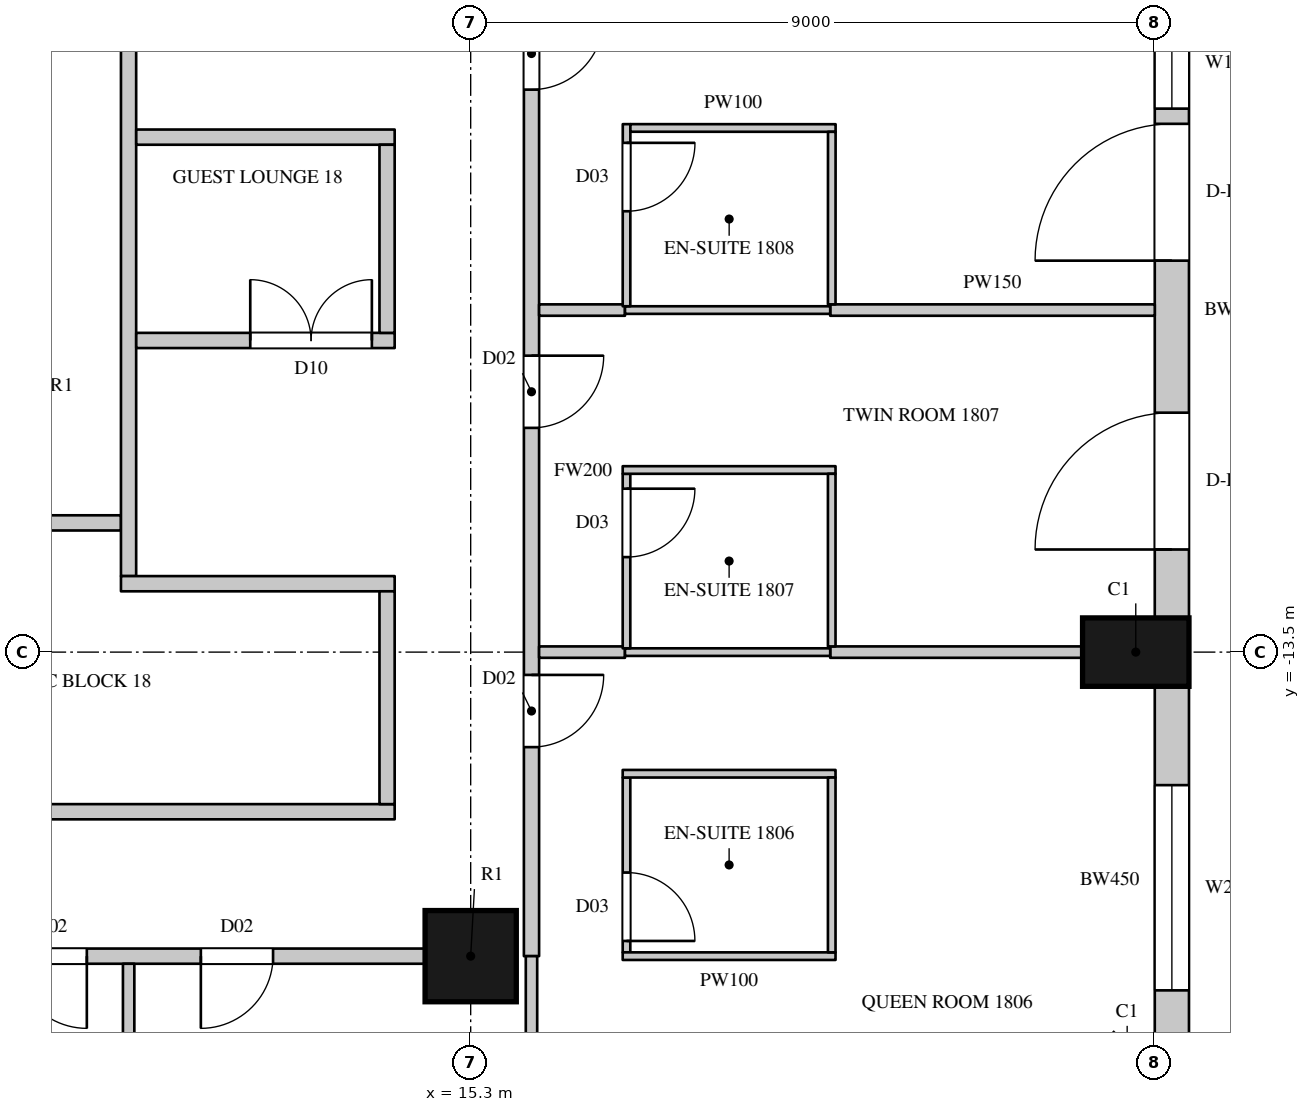
"""IFC4 building model, lengths in metres.
Left out: names, types, materials, properties, quantities, classifications, styles, units other than length and angle.
Written with IfcOpenShell. Run it as: python <this file> out.ifc"""

import sys

from ifc_helpers import new_model, si_unit, direction, frame, frame_2d, origin, origin_2d, place, context, subcontext, project, spatial, rectangle, circle, extrude, element, fill, save


model = new_model("IFC4")
c1 = context("Model", 3, precision=1e-05, world=origin(), true_north=direction((0.0, 1.0)))
c2 = subcontext(c1, "Body", "Model", "MODEL_VIEW")
j1 = project(units=[si_unit("LENGTHUNIT", "METRE"), si_unit("PLANEANGLEUNIT", "RADIAN")], contexts=[c1])
p1 = place(None, origin())
s1 = spatial("IfcSite", under=j1, at=p1, CompositionType="ELEMENT")
p2 = place(p1, origin())
s2 = spatial("IfcBuilding", under=s1, at=p2, CompositionType="ELEMENT")
p3 = place(p2, frame((0.0, 0.0, 95.1)))
s3 = spatial("IfcBuildingStorey", under=s2, at=p3, CompositionType="ELEMENT", Elevation=95.1)
p4 = place(p3, frame((24.05, -13.5, 0.0), z_axis=(0.0, 0.0, 1.0), x_axis=(0.0, 1.0, 0.0)))
e1 = element("IfcColumn", 1, at=p4, inside=s3, PredefinedType="COLUMN", context=c2, shape_type="SweptSolid", body=[
    extrude(rectangle(XDim=0.9, YDim=1.4, at=origin_2d()), origin(), (0.0, 0.0, 1.0), 3.6),
])
p5 = place(p3, frame((15.3, -17.5, 0.0), z_axis=(0.0, 0.0, 1.0), x_axis=(1.0, 0.0, 0.0)))
e2 = element("IfcColumn", 2, at=p5, inside=s3, PredefinedType="COLUMN", context=c2, shape_type="SweptSolid", body=[
    extrude(circle(Radius=0.6, at=origin_2d()), origin(), (0.0, 0.0, 1.0), 3.6),
])
p6 = place(p3, frame((24.525, -19.064, 0.0), z_axis=(0.0, 0.0, 1.0), x_axis=(0.0, 1.0, 0.0)))
e3 = element("IfcWall", 3, at=p6, inside=s3, PredefinedType="SOLIDWALL", context=c2, shape_type="SweptSolid", body=[
    extrude(rectangle(XDim=5.114, YDim=0.45, at=frame_2d((2.557, 0.0))), origin(), (0.0, 0.0, 1.0), 3.3),
])
p7 = place(p6, frame((1.114, 0.0, 1.05)))
e4 = element("IfcOpeningElement", 4, at=p7, cuts=e3, PredefinedType="OPENING", context=c2, shape_type="SweptSolid", body=[
    extrude(rectangle(XDim=2.7, YDim=2.0, at=frame_2d((1.35, 1.0))), frame((0.0, 0.235, 0.0), z_axis=(0.0, -1.0, 0.0), x_axis=(1.0, 0.0, 0.0)), (0.0, 0.0, 1.0), 0.47),
])
p8 = place(p3, frame((24.525, -13.05, 0.0), z_axis=(0.0, 0.0, 1.0), x_axis=(0.0, 1.0, 0.0)))
e5 = element("IfcWall", 5, at=p8, inside=s3, PredefinedType="SOLIDWALL", context=c2, shape_type="SweptSolid", body=[
    extrude(rectangle(XDim=8.1, YDim=0.45, at=frame_2d((4.05, 0.0))), origin(), (0.0, 0.0, 1.0), 3.3),
])
p9 = place(p8, frame((0.9, 0.0, 0.0)))
e6 = element("IfcOpeningElement", 6, at=p9, cuts=e5, PredefinedType="OPENING", context=c2, shape_type="SweptSolid", body=[
    extrude(rectangle(XDim=1.8, YDim=2.4, at=frame_2d((0.9, 1.2))), frame((0.0, 0.235, 0.0), z_axis=(0.0, -1.0, 0.0), x_axis=(1.0, 0.0, 0.0)), (0.0, 0.0, 1.0), 0.47),
])
p10 = place(p8, frame((4.7, 0.0, 0.0)))
e7 = element("IfcOpeningElement", 7, at=p10, cuts=e5, PredefinedType="OPENING", context=c2, shape_type="SweptSolid", body=[
    extrude(rectangle(XDim=1.8, YDim=2.4, at=frame_2d((0.9, 1.2))), frame((0.0, 0.235, 0.0), z_axis=(0.0, -1.0, 0.0), x_axis=(1.0, 0.0, 0.0)), (0.0, 0.0, 1.0), 0.47),
])
p11 = place(p8, frame((6.7, 0.0, 1.05)))
e8 = element("IfcOpeningElement", 8, at=p11, cuts=e5, PredefinedType="OPENING", context=c2, shape_type="SweptSolid", body=[
    extrude(rectangle(XDim=1.2, YDim=2.0, at=frame_2d((0.6, 1.0))), frame((0.0, 0.235, 0.0), z_axis=(0.0, -1.0, 0.0), x_axis=(1.0, 0.0, 0.0)), (0.0, 0.0, 1.0), 0.47),
])
p12 = place(p3, frame((6.9, -17.5, 0.0), z_axis=(0.0, 0.0, 1.0), x_axis=(1.0, 0.0, 0.0)))
e9 = element("IfcWall", 9, at=p12, inside=s3, PredefinedType="PARTITIONING", context=c2, shape_type="SweptSolid", body=[
    extrude(rectangle(XDim=7.8, YDim=0.2, at=frame_2d((3.9, 0.0))), origin(), (0.0, 0.0, 1.0), 2.75),
])
p13 = place(p12, frame((2.4, 0.0, 0.0)))
e10 = element("IfcOpeningElement", 10, at=p13, cuts=e9, PredefinedType="OPENING", context=c2, shape_type="SweptSolid", body=[
    extrude(rectangle(XDim=0.95, YDim=2.2, at=frame_2d((0.475, 1.1))), frame((0.0, 0.11, 0.0), z_axis=(0.0, -1.0, 0.0), x_axis=(1.0, 0.0, 0.0)), (0.0, 0.0, 1.0), 0.22),
])
p14 = place(p12, frame((4.85, 0.0, 0.0)))
e11 = element("IfcOpeningElement", 11, at=p14, cuts=e9, PredefinedType="OPENING", context=c2, shape_type="SweptSolid", body=[
    extrude(rectangle(XDim=0.95, YDim=2.2, at=frame_2d((0.475, 1.1))), frame((0.0, 0.11, 0.0), z_axis=(0.0, -1.0, 0.0), x_axis=(1.0, 0.0, 0.0)), (0.0, 0.0, 1.0), 0.22),
])
p15 = place(p3, frame((-8.7, -11.8, 0.0), z_axis=(0.0, 0.0, 1.0), x_axis=(1.0, 0.0, 0.0)))
e12 = element("IfcWall", 12, at=p15, inside=s3, PredefinedType="PARTITIONING", context=c2, shape_type="SweptSolid", body=[
    extrude(rectangle(XDim=19.4, YDim=0.2, at=frame_2d((9.7, 0.0))), origin(), (0.0, 0.0, 1.0), 3.3),
])
p16 = place(p15, frame((6.95, 0.0, 0.0)))
e13 = element("IfcOpeningElement", 13, at=p16, cuts=e12, PredefinedType="OPENING", context=c2, shape_type="SweptSolid", body=[
    extrude(rectangle(XDim=1.5, YDim=2.2, at=frame_2d((0.75, 1.1))), frame((0.0, 0.11, 0.0), z_axis=(0.0, -1.0, 0.0), x_axis=(1.0, 0.0, 0.0)), (0.0, 0.0, 1.0), 0.22),
])
p17 = place(p3, frame((0.1, -15.6, 0.0), z_axis=(0.0, 0.0, 1.0), x_axis=(1.0, 0.0, 0.0)))
e14 = element("IfcWall", 14, at=p17, inside=s3, PredefinedType="PARTITIONING", context=c2, shape_type="SweptSolid", body=[
    extrude(rectangle(XDim=14.2, YDim=0.2, at=frame_2d((7.1, 0.0))), origin(), (0.0, 0.0, 1.0), 3.3),
])
p18 = place(p3, frame((10.799, -12.5, 0.0), z_axis=(0.0, 0.0, 1.0), x_axis=(0.0, 1.0, 0.0)))
e15 = element("IfcWall", 15, at=p18, inside=s3, PredefinedType="PARTITIONING", context=c2, shape_type="SweptSolid", body=[
    extrude(rectangle(XDim=24.2, YDim=0.2, at=frame_2d((12.1, 0.0))), origin(), (0.0, 0.0, 1.0), 3.3),
])
p19 = place(p18, frame((13.15, 0.0, 0.0)))
e16 = element("IfcOpeningElement", 16, at=p19, cuts=e15, PredefinedType="OPENING", context=c2, shape_type="SweptSolid", body=[
    extrude(rectangle(XDim=1.5, YDim=2.2, at=frame_2d((0.75, 1.1))), frame((0.0, 0.11, 0.0), z_axis=(0.0, -1.0, 0.0), x_axis=(1.0, 0.0, 0.0)), (0.0, 0.0, 1.0), 0.22),
])
p20 = place(p3, frame((10.699, -12.6, 0.0), z_axis=(0.0, 0.0, 1.0), x_axis=(1.0, 0.0, 0.0)))
e17 = element("IfcWall", 17, at=p20, inside=s3, PredefinedType="PARTITIONING", context=c2, shape_type="SweptSolid", body=[
    extrude(rectangle(XDim=3.601, YDim=0.2, at=frame_2d((1.801, 0.0))), origin(), (0.0, 0.0, 1.0), 3.3),
])
p21 = place(p3, frame((10.9, -9.4, 0.0), z_axis=(0.0, 0.0, 1.0), x_axis=(1.0, 0.0, 0.0)))
e18 = element("IfcWall", 18, at=p21, inside=s3, PredefinedType="PARTITIONING", context=c2, shape_type="SweptSolid", body=[
    extrude(rectangle(XDim=3.4, YDim=0.2, at=frame_2d((1.7, 0.0))), origin(), (0.0, 0.0, 1.0), 3.3),
])
p22 = place(p21, frame((1.5, 0.0, 0.0)))
e19 = element("IfcOpeningElement", 19, at=p22, cuts=e18, PredefinedType="OPENING", context=c2, shape_type="SweptSolid", body=[
    extrude(rectangle(XDim=1.6, YDim=2.4, at=frame_2d((0.8, 1.2))), frame((0.0, 0.11, 0.0), z_axis=(0.0, -1.0, 0.0), x_axis=(1.0, 0.0, 0.0)), (0.0, 0.0, 1.0), 0.22),
])
p23 = place(p3, frame((10.9, -6.725, 0.0), z_axis=(0.0, 0.0, 1.0), x_axis=(1.0, 0.0, 0.0)))
e20 = element("IfcWall", 20, at=p23, inside=s3, PredefinedType="PARTITIONING", context=c2, shape_type="SweptSolid", body=[
    extrude(rectangle(XDim=3.4, YDim=0.2, at=frame_2d((1.7, 0.0))), origin(), (0.0, 0.0, 1.0), 3.3),
])
p24 = place(p3, frame((14.2, -15.5, 0.0), z_axis=(0.0, 0.0, 1.0), x_axis=(0.0, 1.0, 0.0)))
e21 = element("IfcWall", 21, at=p24, inside=s3, PredefinedType="PARTITIONING", context=c2, shape_type="SweptSolid", body=[
    extrude(rectangle(XDim=2.8, YDim=0.2, at=frame_2d((1.4, 0.0))), origin(), (0.0, 0.0, 1.0), 3.3),
])
p25 = place(p3, frame((14.2, -9.3, 0.0), z_axis=(0.0, 0.0, 1.0), x_axis=(0.0, 1.0, 0.0)))
e22 = element("IfcWall", 22, at=p25, inside=s3, PredefinedType="PARTITIONING", context=c2, shape_type="SweptSolid", body=[
    extrude(rectangle(XDim=2.475, YDim=0.2, at=frame_2d((1.238, 0.0))), origin(), (0.0, 0.0, 1.0), 3.3),
])
p26 = place(p3, frame((16.1, -17.5, 0.0), z_axis=(0.0, 0.0, 1.0), x_axis=(0.0, 1.0, 0.0)))
e23 = element("IfcWall", 23, at=p26, inside=s3, PredefinedType="PARTITIONING", context=c2, shape_type="SweptSolid", body=[
    extrude(rectangle(XDim=12.75, YDim=0.2, at=frame_2d((6.375, 0.0))), origin(), (0.0, 0.0, 1.0), 3.3),
])
p27 = place(p26, frame((2.75, 0.0, 0.0)))
e24 = element("IfcOpeningElement", 24, at=p27, cuts=e23, PredefinedType="OPENING", context=c2, shape_type="SweptSolid", body=[
    extrude(rectangle(XDim=0.95, YDim=2.2, at=frame_2d((0.475, 1.1))), frame((0.0, 0.11, 0.0), z_axis=(0.0, -1.0, 0.0), x_axis=(1.0, 0.0, 0.0)), (0.0, 0.0, 1.0), 0.22),
])
p28 = place(p26, frame((6.95, 0.0, 0.0)))
e25 = element("IfcOpeningElement", 25, at=p28, cuts=e23, PredefinedType="OPENING", context=c2, shape_type="SweptSolid", body=[
    extrude(rectangle(XDim=0.95, YDim=2.2, at=frame_2d((0.475, 1.1))), frame((0.0, 0.11, 0.0), z_axis=(0.0, -1.0, 0.0), x_axis=(1.0, 0.0, 0.0)), (0.0, 0.0, 1.0), 0.22),
])
p29 = place(p26, frame((11.4, 0.0, 0.0)))
e26 = element("IfcOpeningElement", 26, at=p29, cuts=e23, PredefinedType="OPENING", context=c2, shape_type="SweptSolid", body=[
    extrude(rectangle(XDim=0.95, YDim=2.2, at=frame_2d((0.475, 1.1))), frame((0.0, 0.11, 0.0), z_axis=(0.0, -1.0, 0.0), x_axis=(1.0, 0.0, 0.0)), (0.0, 0.0, 1.0), 0.22),
])
p30 = place(p3, frame((10.8, -25.7, 0.0), z_axis=(0.0, 0.0, 1.0), x_axis=(0.0, 1.0, 0.0)))
e27 = element("IfcWall", 27, at=p30, inside=s3, PredefinedType="PARTITIONING", context=c2, shape_type="SweptSolid", body=[
    extrude(rectangle(XDim=8.1, YDim=0.15, at=frame_2d((4.05, 0.0))), origin(), (0.0, 0.0, 1.0), 2.65),
])
p31 = place(p3, frame((16.1, -18.73, 0.0), z_axis=(0.0, 0.0, 1.0), x_axis=(0.0, 1.0, 0.0)))
e28 = element("IfcWall", 28, at=p31, inside=s3, PredefinedType="PARTITIONING", context=c2, shape_type="SweptSolid", body=[
    extrude(rectangle(XDim=1.23, YDim=0.15, at=frame_2d((0.615, 0.0))), origin(), (0.0, 0.0, 1.0), 3.3),
])
p32 = place(p3, frame((16.2, -13.5, 0.0), z_axis=(0.0, 0.0, 1.0), x_axis=(1.0, 0.0, 0.0)))
e29 = element("IfcWall", 29, at=p32, inside=s3, PredefinedType="PARTITIONING", context=c2, shape_type="SweptSolid", body=[
    extrude(rectangle(XDim=1.13, YDim=0.15, at=frame_2d((0.565, 0.0))), origin(), (0.0, 0.0, 1.0), 3.3),
])
p33 = place(p3, frame((16.2, -9.0, 0.0), z_axis=(0.0, 0.0, 1.0), x_axis=(1.0, 0.0, 0.0)))
e30 = element("IfcWall", 30, at=p33, inside=s3, PredefinedType="PARTITIONING", context=c2, shape_type="SweptSolid", body=[
    extrude(rectangle(XDim=1.13, YDim=0.15, at=frame_2d((0.565, 0.0))), origin(), (0.0, 0.0, 1.0), 2.65),
])
p34 = place(p3, frame((20.03, -13.5, 0.0), z_axis=(0.0, 0.0, 1.0), x_axis=(1.0, 0.0, 0.0)))
e31 = element("IfcWall", 31, at=p34, inside=s3, PredefinedType="PARTITIONING", context=c2, shape_type="SweptSolid", body=[
    extrude(rectangle(XDim=3.32, YDim=0.15, at=frame_2d((1.66, 0.0))), origin(), (0.0, 0.0, 1.0), 3.3),
])
p35 = place(p3, frame((20.03, -9.0, 0.0), z_axis=(0.0, 0.0, 1.0), x_axis=(1.0, 0.0, 0.0)))
e32 = element("IfcWall", 32, at=p35, inside=s3, PredefinedType="PARTITIONING", context=c2, shape_type="SweptSolid", body=[
    extrude(rectangle(XDim=4.27, YDim=0.15, at=frame_2d((2.135, 0.0))), origin(), (0.0, 0.0, 1.0), 2.65),
])
p36 = place(p3, frame((17.33, -13.5, 0.0), z_axis=(0.0, 0.0, 1.0), x_axis=(1.0, 0.0, 0.0)))
e33 = element("IfcWall", 33, at=p36, inside=s3, PredefinedType="PARTITIONING", context=c2, shape_type="SweptSolid", body=[
    extrude(rectangle(XDim=2.7, YDim=0.1, at=frame_2d((1.35, 0.0))), origin(), (0.0, 0.0, 1.0), 3.3),
])
p37 = place(p3, frame((17.33, -9.0, 0.0), z_axis=(0.0, 0.0, 1.0), x_axis=(1.0, 0.0, 0.0)))
e34 = element("IfcWall", 34, at=p37, inside=s3, PredefinedType="PARTITIONING", context=c2, shape_type="SweptSolid", body=[
    extrude(rectangle(XDim=2.7, YDim=0.1, at=frame_2d((1.35, 0.0))), origin(), (0.0, 0.0, 1.0), 2.65),
])
p38 = place(p3, frame((17.35, -17.45, 0.0), z_axis=(0.0, 0.0, 1.0), x_axis=(0.0, 1.0, 0.0)))
e35 = element("IfcWall", 35, at=p38, inside=s3, PredefinedType="PARTITIONING", context=c2, shape_type="SweptSolid", body=[
    extrude(rectangle(XDim=2.3, YDim=0.1, at=frame_2d((1.15, 0.0))), origin(), (0.0, 0.0, 1.0), 3.3),
])
p39 = place(p38, frame((0.15, 0.0, 0.0)))
e36 = element("IfcOpeningElement", 36, at=p39, cuts=e35, PredefinedType="OPENING", context=c2, shape_type="SweptSolid", body=[
    extrude(rectangle(XDim=0.9, YDim=2.2, at=frame_2d((0.45, 1.1))), frame((0.0, 0.06, 0.0), z_axis=(0.0, -1.0, 0.0), x_axis=(1.0, 0.0, 0.0)), (0.0, 0.0, 1.0), 0.12),
])
for number, where, z_axis, x_axis in (
    (37, (17.3, -17.5, 0.0), (0.0, 0.0, 1.0), (1.0, 0.0, 0.0)),
    (38, (17.3, -15.1, 0.0), (0.0, 0.0, 1.0), (1.0, 0.0, 0.0)),
):
    element("IfcWall", number, at=place(p3, frame(where, z_axis=z_axis, x_axis=x_axis)), inside=s3, PredefinedType="PARTITIONING", context=c2, shape_type="SweptSolid", body=[
        extrude(rectangle(XDim=2.8, YDim=0.1, at=frame_2d((1.4, 0.0))), origin(), (0.0, 0.0, 1.0), 3.3),
    ])
p40 = place(p3, frame((17.35, -13.45, 0.0), z_axis=(0.0, 0.0, 1.0), x_axis=(0.0, 1.0, 0.0)))
e39 = element("IfcWall", 39, at=p40, inside=s3, PredefinedType="PARTITIONING", context=c2, shape_type="SweptSolid", body=[
    extrude(rectangle(XDim=2.296, YDim=0.1, at=frame_2d((1.148, 0.0))), origin(), (0.0, 0.0, 1.0), 3.3),
])
p41 = place(p40, frame((1.2, 0.0, 0.0)))
e40 = element("IfcOpeningElement", 40, at=p41, cuts=e39, PredefinedType="OPENING", context=c2, shape_type="SweptSolid", body=[
    extrude(rectangle(XDim=0.9, YDim=2.2, at=frame_2d((0.45, 1.1))), frame((0.0, 0.06, 0.0), z_axis=(0.0, -1.0, 0.0), x_axis=(1.0, 0.0, 0.0)), (0.0, 0.0, 1.0), 0.12),
])
p42 = place(p3, frame((17.3, -11.104, 0.0), z_axis=(0.0, 0.0, 1.0), x_axis=(1.0, 0.0, 0.0)))
e41 = element("IfcWall", 41, at=p42, inside=s3, PredefinedType="PARTITIONING", context=c2, shape_type="SweptSolid", body=[
    extrude(rectangle(XDim=2.8, YDim=0.1, at=frame_2d((1.4, 0.0))), origin(), (0.0, 0.0, 1.0), 3.3),
])
p43 = place(p3, frame((17.35, -8.95, 0.0), z_axis=(0.0, 0.0, 1.0), x_axis=(0.000407580973, 0.999999916939, 0.0)))
e42 = element("IfcWall", 42, at=p43, inside=s3, PredefinedType="PARTITIONING", context=c2, shape_type="SweptSolid", body=[
    extrude(rectangle(XDim=2.396, YDim=0.1, at=frame_2d((1.198, 0.0))), origin(), (0.0, 0.0, 1.0), 3.3),
])
p44 = place(p43, frame((1.25, 0.0, 0.0)))
e43 = element("IfcOpeningElement", 43, at=p44, cuts=e42, PredefinedType="OPENING", context=c2, shape_type="SweptSolid", body=[
    extrude(rectangle(XDim=0.9, YDim=2.2, at=frame_2d((0.45, 1.1))), frame((0.0, 0.06, 0.0), z_axis=(0.0, -1.0, 0.0), x_axis=(1.0, 0.0, 0.0)), (0.0, 0.0, 1.0), 0.12),
])
p45 = place(p3, frame((17.401, -6.604, 0.0), z_axis=(0.0, 0.0, 1.0), x_axis=(0.9999999346, -0.000361663629, 0.0)))
e44 = element("IfcWall", 44, at=p45, inside=s3, PredefinedType="PARTITIONING", context=c2, shape_type="SweptSolid", body=[
    extrude(rectangle(XDim=2.7, YDim=0.1, at=frame_2d((1.35, 0.0))), origin(), (0.0, 0.0, 1.0), 3.3),
])
p46 = place(p3, frame((20.05, -17.45, 0.0), z_axis=(0.0, 0.0, 1.0), x_axis=(0.0, 1.0, 0.0)))
e45 = element("IfcWall", 45, at=p46, inside=s3, PredefinedType="PARTITIONING", context=c2, shape_type="SweptSolid", body=[
    extrude(rectangle(XDim=2.3, YDim=0.1, at=frame_2d((1.15, 0.0))), origin(), (0.0, 0.0, 1.0), 3.3),
])
p47 = place(p3, frame((20.05, -13.425, 0.0), z_axis=(0.0, 0.0, 1.0), x_axis=(0.0, 1.0, 0.0)))
e46 = element("IfcWall", 46, at=p47, inside=s3, PredefinedType="PARTITIONING", context=c2, shape_type="SweptSolid", body=[
    extrude(rectangle(XDim=2.271, YDim=0.1, at=frame_2d((1.135, 0.0))), origin(), (0.0, 0.0, 1.0), 3.3),
])
p48 = place(p3, frame((20.05, -8.925, 0.0), z_axis=(0.0, 0.0, 1.0), x_axis=(0.000430200003, 0.999999907464, 0.0)))
e47 = element("IfcWall", 47, at=p48, inside=s3, PredefinedType="PARTITIONING", context=c2, shape_type="SweptSolid", body=[
    extrude(rectangle(XDim=2.27, YDim=0.1, at=frame_2d((1.135, 0.0))), origin(), (0.0, 0.0, 1.0), 3.3),
])
p49 = place(p7, origin())
e48 = element("IfcWindow", 48, at=p49, inside=s3, PartitioningType="SINGLE_PANEL", PredefinedType="WINDOW", context=c2, shape_type="SweptSolid", body=[
    extrude(rectangle(XDim=2.7, YDim=2.0, at=frame_2d((1.35, 1.0))), frame((0.0, 0.135, 0.0), z_axis=(0.0, -1.0, 0.0), x_axis=(1.0, 0.0, 0.0)), (0.0, 0.0, 1.0), 0.06),
])
fill(e4, e48)
p50 = place(p9, origin())
e49 = element("IfcDoor", 49, at=p50, inside=s3, OperationType="SLIDING_TO_LEFT", PredefinedType="DOOR", context=c2, shape_type="SweptSolid", body=[
    extrude(rectangle(XDim=1.8, YDim=2.4, at=frame_2d((0.9, 1.2))), frame((0.0, 0.13, 0.0), z_axis=(0.0, -1.0, 0.0), x_axis=(1.0, 0.0, 0.0)), (0.0, 0.0, 1.0), 0.05),
])
fill(e6, e49)
p51 = place(p10, origin())
e50 = element("IfcDoor", 50, at=p51, inside=s3, OperationType="SLIDING_TO_LEFT", PredefinedType="DOOR", context=c2, shape_type="SweptSolid", body=[
    extrude(rectangle(XDim=1.8, YDim=2.4, at=frame_2d((0.9, 1.2))), frame((0.0, 0.13, 0.0), z_axis=(0.0, -1.0, 0.0), x_axis=(1.0, 0.0, 0.0)), (0.0, 0.0, 1.0), 0.05),
])
fill(e7, e50)
p52 = place(p11, origin())
e51 = element("IfcWindow", 51, at=p52, inside=s3, PartitioningType="SINGLE_PANEL", PredefinedType="WINDOW", context=c2, shape_type="SweptSolid", body=[
    extrude(rectangle(XDim=1.2, YDim=2.0, at=frame_2d((0.6, 1.0))), frame((0.0, 0.135, 0.0), z_axis=(0.0, -1.0, 0.0), x_axis=(1.0, 0.0, 0.0)), (0.0, 0.0, 1.0), 0.06),
])
fill(e8, e51)
p53 = place(p22, origin())
e52 = element("IfcDoor", 52, at=p53, inside=s3, OperationType="DOUBLE_DOOR_SINGLE_SWING", PredefinedType="DOOR", context=c2, shape_type="SweptSolid", body=[
    extrude(rectangle(XDim=1.6, YDim=2.4, at=frame_2d((0.8, 1.2))), frame((0.0, 0.025, 0.0), z_axis=(0.0, -1.0, 0.0), x_axis=(1.0, 0.0, 0.0)), (0.0, 0.0, 1.0), 0.05),
])
fill(e19, e52)
p54 = place(p27, origin())
e53 = element("IfcDoor", 53, at=p54, inside=s3, OperationType="SINGLE_SWING_LEFT", PredefinedType="DOOR", context=c2, shape_type="SweptSolid", body=[
    extrude(rectangle(XDim=0.95, YDim=2.2, at=frame_2d((0.475, 1.1))), frame((0.0, 0.025, 0.0), z_axis=(0.0, -1.0, 0.0), x_axis=(1.0, 0.0, 0.0)), (0.0, 0.0, 1.0), 0.05),
])
fill(e24, e53)
p55 = place(p39, origin())
e54 = element("IfcDoor", 54, at=p55, inside=s3, OperationType="SINGLE_SWING_RIGHT", PredefinedType="DOOR", context=c2, shape_type="SweptSolid", body=[
    extrude(rectangle(XDim=0.9, YDim=2.2, at=frame_2d((0.45, 1.1))), frame((0.0, 0.025, 0.0), z_axis=(0.0, -1.0, 0.0), x_axis=(1.0, 0.0, 0.0)), (0.0, 0.0, 1.0), 0.05),
])
fill(e36, e54)
p56 = place(p28, origin())
e55 = element("IfcDoor", 55, at=p56, inside=s3, OperationType="SINGLE_SWING_LEFT", PredefinedType="DOOR", context=c2, shape_type="SweptSolid", body=[
    extrude(rectangle(XDim=0.95, YDim=2.2, at=frame_2d((0.475, 1.1))), frame((0.0, 0.025, 0.0), z_axis=(0.0, -1.0, 0.0), x_axis=(1.0, 0.0, 0.0)), (0.0, 0.0, 1.0), 0.05),
])
fill(e25, e55)
p57 = place(p41, origin())
e56 = element("IfcDoor", 56, at=p57, inside=s3, OperationType="SINGLE_SWING_LEFT", PredefinedType="DOOR", context=c2, shape_type="SweptSolid", body=[
    extrude(rectangle(XDim=0.9, YDim=2.2, at=frame_2d((0.45, 1.1))), frame((0.0, 0.025, 0.0), z_axis=(0.0, -1.0, 0.0), x_axis=(1.0, 0.0, 0.0)), (0.0, 0.0, 1.0), 0.05),
])
fill(e40, e56)
p58 = place(p29, origin())
e57 = element("IfcDoor", 57, at=p58, inside=s3, OperationType="SINGLE_SWING_LEFT", PredefinedType="DOOR", context=c2, shape_type="SweptSolid", body=[
    extrude(rectangle(XDim=0.95, YDim=2.2, at=frame_2d((0.475, 1.1))), frame((0.0, 0.025, 0.0), z_axis=(0.0, -1.0, 0.0), x_axis=(1.0, 0.0, 0.0)), (0.0, 0.0, 1.0), 0.05),
])
fill(e26, e57)
p59 = place(p44, origin())
e58 = element("IfcDoor", 58, at=p59, inside=s3, OperationType="SINGLE_SWING_LEFT", PredefinedType="DOOR", context=c2, shape_type="SweptSolid", body=[
    extrude(rectangle(XDim=0.9, YDim=2.2, at=frame_2d((0.45, 1.1))), frame((0.0, 0.025, 0.0), z_axis=(0.0, -1.0, 0.0), x_axis=(1.0, 0.0, 0.0)), (0.0, 0.0, 1.0), 0.05),
])
fill(e43, e58)
p60 = place(p13, origin())
e59 = element("IfcDoor", 59, at=p60, inside=s3, OperationType="SINGLE_SWING_LEFT", PredefinedType="DOOR", context=c2, shape_type="SweptSolid", body=[
    extrude(rectangle(XDim=0.95, YDim=2.2, at=frame_2d((0.475, 1.1))), frame((0.0, 0.025, 0.0), z_axis=(0.0, -1.0, 0.0), x_axis=(1.0, 0.0, 0.0)), (0.0, 0.0, 1.0), 0.05),
])
fill(e10, e59)
p61 = place(p14, origin())
e60 = element("IfcDoor", 60, at=p61, inside=s3, OperationType="SINGLE_SWING_RIGHT", PredefinedType="DOOR", context=c2, shape_type="SweptSolid", body=[
    extrude(rectangle(XDim=0.95, YDim=2.2, at=frame_2d((0.475, 1.1))), frame((0.0, 0.025, 0.0), z_axis=(0.0, -1.0, 0.0), x_axis=(1.0, 0.0, 0.0)), (0.0, 0.0, 1.0), 0.05),
])
fill(e11, e60)
save(model, sys.argv[1])
